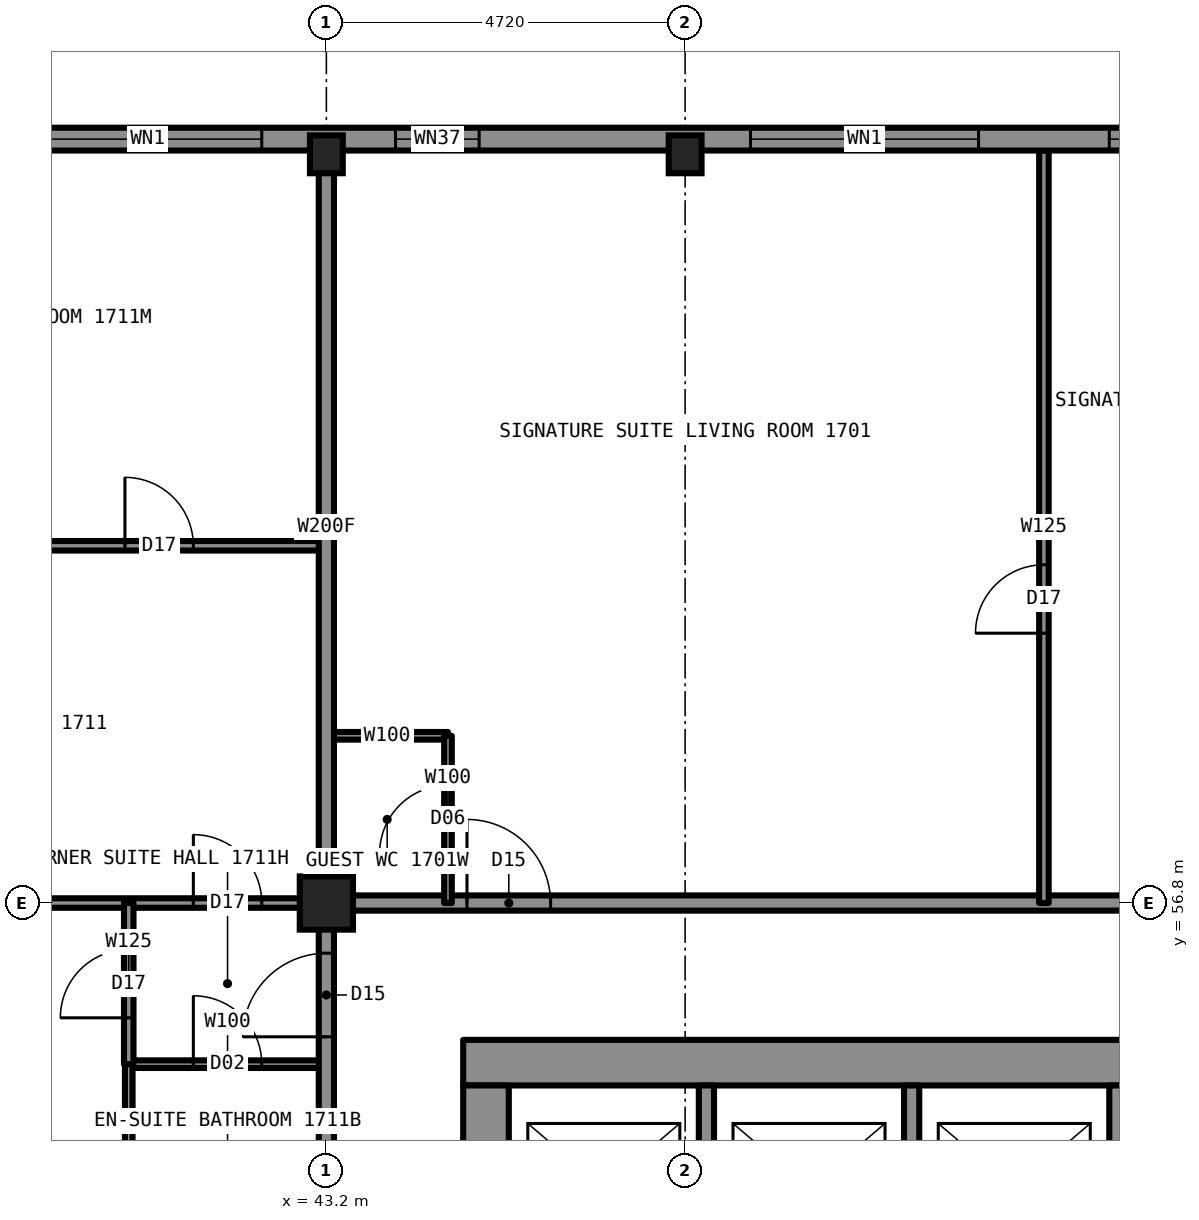
"""IFC4 building model, lengths in metres.
Left out: names, types, materials, properties, quantities, classifications, styles, units other than length and angle.
Written with IfcOpenShell. Run it as: python <this file> out.ifc"""

import sys

from ifc_helpers import new_model, si_unit, direction, frame, frame_2d, origin, origin_2d, place, context, subcontext, project, spatial, rectangle, hollow_rectangle, i_section, extrude, element, fill, save


model = new_model("IFC4")
c1 = context("Model", 3, precision=1e-05, world=origin(), true_north=direction((0.0, 1.0)))
c2 = subcontext(c1, "Body", "Model", "MODEL_VIEW")
j1 = project(units=[si_unit("LENGTHUNIT", "METRE"), si_unit("PLANEANGLEUNIT", "RADIAN")], contexts=[c1])
p1 = place(None, origin())
s1 = spatial("IfcSite", under=j1, at=p1, CompositionType="ELEMENT")
p2 = place(p1, origin())
s2 = spatial("IfcBuilding", under=s1, at=p2, CompositionType="ELEMENT")
p3 = place(p2, frame((0.0, 0.0, 60.0)))
s3 = spatial("IfcBuildingStorey", under=s2, at=p3, CompositionType="ELEMENT", Elevation=60.0)
for number, where, z_axis, x_axis in (
    (1, (43.2, 66.65, 0.0), (0.0, 0.0, 1.0), (1.0, 0.0, 0.0)),
    (2, (47.92, 66.65, 0.0), (0.0, 0.0, 1.0), (1.0, 0.0, 0.0)),
):
    element("IfcColumn", number, at=place(p3, frame(where, z_axis=z_axis, x_axis=x_axis)), inside=s3, PredefinedType="COLUMN", context=c2, shape_type="SweptSolid", body=[
        extrude(i_section(OverallWidth=0.432, OverallDepth=0.498, WebThickness=0.056, FlangeThickness=0.089, at=origin_2d()), origin(), (0.0, 0.0, 1.0), 3.5),
    ])
p4 = place(p3, frame((43.2, 56.8, 0.0), z_axis=(0.0, 0.0, 1.0), x_axis=(1.0, 0.0, 0.0)))
e3 = element("IfcColumn", 3, at=p4, inside=s3, PredefinedType="COLUMN", context=c2, shape_type="SweptSolid", body=[
    extrude(hollow_rectangle(XDim=0.7, YDim=0.7, WallThickness=0.06, at=origin_2d()), origin(), (0.0, 0.0, 1.0), 3.5),
])
p5 = place(p3, frame((45.0, 54.7, 0.0), z_axis=(0.0, 0.0, 1.0), x_axis=(1.0, 0.0, 0.0)))
e4 = element("IfcWall", 4, at=p5, inside=s3, PredefinedType="SHEAR", context=c2, shape_type="SweptSolid", body=[
    extrude(rectangle(XDim=20.0, YDim=0.6, at=frame_2d((10.0, 0.0))), origin(), (0.0, 0.0, 1.0), 3.5),
])
p6 = place(p3, frame((45.3, 35.6, 0.0), z_axis=(0.0, 0.0, 1.0), x_axis=(0.0, 1.0, 0.0)))
e5 = element("IfcWall", 5, at=p6, inside=s3, PredefinedType="SHEAR", context=c2, shape_type="SweptSolid", body=[
    extrude(rectangle(XDim=18.8, YDim=0.6, at=frame_2d((9.4, 0.0))), origin(), (0.0, 0.0, 1.0), 3.5),
])
p7 = place(p6, frame((13.4, 0.0, 0.0)))
e6 = element("IfcOpeningElement", 6, at=p7, cuts=e5, PredefinedType="OPENING", context=c2, shape_type="SweptSolid", body=[
    extrude(rectangle(XDim=1.8, YDim=2.2, at=frame_2d((0.9, 1.1))), frame((0.0, 0.31, 0.0), z_axis=(0.0, -1.0, 0.0), x_axis=(1.0, 0.0, 0.0)), (0.0, 0.0, 1.0), 0.62),
])
p8 = place(p6, frame((3.6, 0.0, 0.0)))
e7 = element("IfcOpeningElement", 7, at=p8, cuts=e5, PredefinedType="OPENING", context=c2, shape_type="SweptSolid", body=[
    extrude(rectangle(XDim=1.8, YDim=2.2, at=frame_2d((0.9, 1.1))), frame((0.0, 0.31, 0.0), z_axis=(0.0, -1.0, 0.0), x_axis=(1.0, 0.0, 0.0)), (0.0, 0.0, 1.0), 0.62),
])
p9 = place(p6, frame((6.4, 0.0, 0.0)))
e8 = element("IfcOpeningElement", 8, at=p9, cuts=e5, PredefinedType="OPENING", context=c2, shape_type="SweptSolid", body=[
    extrude(rectangle(XDim=1.2, YDim=2.2, at=frame_2d((0.6, 1.1))), frame((0.0, 0.31, 0.0), z_axis=(0.0, -1.0, 0.0), x_axis=(1.0, 0.0, 0.0)), (0.0, 0.0, 1.0), 0.62),
])
p10 = place(p3, frame((43.2, 56.8, 0.0), z_axis=(0.0, 0.0, 1.0), x_axis=(1.0, 0.0, 0.0)))
e9 = element("IfcWall", 9, at=p10, inside=s3, PredefinedType="PARTITIONING", context=c2, shape_type="SweptSolid", body=[
    extrude(rectangle(XDim=23.6, YDim=0.2, at=frame_2d((11.8, 0.0))), origin(), (0.0, 0.0, 1.0), 3.33),
])
p11 = place(p10, frame((1.85, 0.0, 0.0)))
e10 = element("IfcOpeningElement", 10, at=p11, cuts=e9, PredefinedType="OPENING", context=c2, shape_type="SweptSolid", body=[
    extrude(rectangle(XDim=1.1, YDim=2.2, at=frame_2d((0.55, 1.1))), frame((0.0, 0.11, 0.0), z_axis=(0.0, -1.0, 0.0), x_axis=(1.0, 0.0, 0.0)), (0.0, 0.0, 1.0), 0.22),
])
p12 = place(p10, frame((17.16, 0.0, 0.0)))
e11 = element("IfcOpeningElement", 11, at=p12, cuts=e9, PredefinedType="OPENING", context=c2, shape_type="SweptSolid", body=[
    extrude(rectangle(XDim=1.0, YDim=2.2, at=frame_2d((0.5, 1.1))), frame((0.0, 0.11, 0.0), z_axis=(0.0, -1.0, 0.0), x_axis=(1.0, 0.0, 0.0)), (0.0, 0.0, 1.0), 0.22),
])
p13 = place(p3, frame((33.3, 56.8, 0.0), z_axis=(0.0, 0.0, 1.0), x_axis=(1.0, 0.0, 0.0)))
e12 = element("IfcWall", 12, at=p13, inside=s3, PredefinedType="PARTITIONING", context=c2, shape_type="SweptSolid", body=[
    extrude(rectangle(XDim=9.9, YDim=0.125, at=frame_2d((4.95, 0.0))), origin(), (0.0, 0.0, 1.0), 2.573),
])
p14 = place(p13, frame((8.15, 0.0, 0.0)))
e13 = element("IfcOpeningElement", 13, at=p14, cuts=e12, PredefinedType="OPENING", context=c2, shape_type="SweptSolid", body=[
    extrude(rectangle(XDim=0.9, YDim=2.2, at=frame_2d((0.45, 1.1))), frame((0.0, 0.073, 0.0), z_axis=(0.0, -1.0, 0.0), x_axis=(1.0, 0.0, 0.0)), (0.0, 0.0, 1.0), 0.145),
])
p15 = place(p3, frame((43.2, 59.0, 0.0), z_axis=(0.0, 0.0, 1.0), x_axis=(1.0, 0.0, 0.0)))
e14 = element("IfcWall", 14, at=p15, inside=s3, PredefinedType="PARTITIONING", context=c2, shape_type="SweptSolid", body=[
    extrude(rectangle(XDim=1.6, YDim=0.1, at=frame_2d((0.8, 0.0))), origin(), (0.0, 0.0, 1.0), 3.33),
])
p16 = place(p3, frame((33.306, 61.5, 0.0), z_axis=(0.0, 0.0, 1.0), x_axis=(1.0, 0.0, 0.0)))
e15 = element("IfcWall", 15, at=p16, inside=s3, PredefinedType="PARTITIONING", context=c2, shape_type="SweptSolid", body=[
    extrude(rectangle(XDim=9.894, YDim=0.125, at=frame_2d((4.947, 0.0))), origin(), (0.0, 0.0, 1.0), 3.33),
])
p17 = place(p16, frame((7.244, 0.0, 0.0)))
e16 = element("IfcOpeningElement", 16, at=p17, cuts=e15, PredefinedType="OPENING", context=c2, shape_type="SweptSolid", body=[
    extrude(rectangle(XDim=0.9, YDim=2.2, at=frame_2d((0.45, 1.1))), frame((0.0, 0.073, 0.0), z_axis=(0.0, -1.0, 0.0), x_axis=(1.0, 0.0, 0.0)), (0.0, 0.0, 1.0), 0.145),
])
p18 = place(p3, frame((40.6, 54.68, 0.0), z_axis=(0.0, 0.0, 1.0), x_axis=(1.0, 0.0, 0.0)))
e17 = element("IfcWall", 17, at=p18, inside=s3, PredefinedType="PARTITIONING", context=c2, shape_type="SweptSolid", body=[
    extrude(rectangle(XDim=2.6, YDim=0.1, at=frame_2d((1.3, 0.0))), origin(), (0.0, 0.0, 1.0), 3.33),
])
p19 = place(p18, frame((0.85, 0.0, 0.0)))
e18 = element("IfcOpeningElement", 18, at=p19, cuts=e17, PredefinedType="OPENING", context=c2, shape_type="SweptSolid", body=[
    extrude(rectangle(XDim=0.9, YDim=2.1, at=frame_2d((0.45, 1.05))), frame((0.0, 0.06, 0.0), z_axis=(0.0, -1.0, 0.0), x_axis=(1.0, 0.0, 0.0)), (0.0, 0.0, 1.0), 0.12),
])
p20 = place(p3, frame((44.8, 56.8, 0.0), z_axis=(0.0, 0.0, 1.0), x_axis=(0.0, 1.0, 0.0)))
e19 = element("IfcWall", 19, at=p20, inside=s3, PredefinedType="PARTITIONING", context=c2, shape_type="SweptSolid", body=[
    extrude(rectangle(XDim=2.2, YDim=0.1, at=frame_2d((1.1, 0.0))), origin(), (0.0, 0.0, 1.0), 3.33),
])
p21 = place(p20, frame((0.65, 0.0, 0.0)))
e20 = element("IfcOpeningElement", 20, at=p21, cuts=e19, PredefinedType="OPENING", context=c2, shape_type="SweptSolid", body=[
    extrude(rectangle(XDim=0.9, YDim=2.1, at=frame_2d((0.45, 1.05))), frame((0.0, 0.06, 0.0), z_axis=(0.0, -1.0, 0.0), x_axis=(1.0, 0.0, 0.0)), (0.0, 0.0, 1.0), 0.12),
])
p22 = place(p3, frame((43.2, 33.22, 0.0), z_axis=(0.0, 0.0, 1.0), x_axis=(0.0, 1.0, 0.0)))
e21 = element("IfcWall", 21, at=p22, inside=s3, PredefinedType="PARTITIONING", context=c2, shape_type="SweptSolid", body=[
    extrude(rectangle(XDim=23.58, YDim=0.2, at=frame_2d((11.79, 0.0))), origin(), (0.0, 0.0, 1.0), 3.33),
])
p23 = place(p22, frame((7.7, 0.0, 0.0)))
e22 = element("IfcOpeningElement", 22, at=p23, cuts=e21, PredefinedType="OPENING", context=c2, shape_type="SweptSolid", body=[
    extrude(rectangle(XDim=1.0, YDim=2.2, at=frame_2d((0.5, 1.1))), frame((0.0, 0.11, 0.0), z_axis=(0.0, -1.0, 0.0), x_axis=(1.0, 0.0, 0.0)), (0.0, 0.0, 1.0), 0.22),
])
p24 = place(p22, frame((16.4, 0.0, 0.0)))
e23 = element("IfcOpeningElement", 23, at=p24, cuts=e21, PredefinedType="OPENING", context=c2, shape_type="SweptSolid", body=[
    extrude(rectangle(XDim=1.0, YDim=2.2, at=frame_2d((0.5, 1.1))), frame((0.0, 0.11, 0.0), z_axis=(0.0, -1.0, 0.0), x_axis=(1.0, 0.0, 0.0)), (0.0, 0.0, 1.0), 0.22),
])
p25 = place(p22, frame((21.82, 0.0, 0.0)))
e24 = element("IfcOpeningElement", 24, at=p25, cuts=e21, PredefinedType="OPENING", context=c2, shape_type="SweptSolid", body=[
    extrude(rectangle(XDim=1.1, YDim=2.2, at=frame_2d((0.55, 1.1))), frame((0.0, 0.11, 0.0), z_axis=(0.0, -1.0, 0.0), x_axis=(1.0, 0.0, 0.0)), (0.0, 0.0, 1.0), 0.22),
])
p26 = place(p22, frame((0.64, 0.0, 0.0)))
e25 = element("IfcOpeningElement", 25, at=p26, cuts=e21, PredefinedType="OPENING", context=c2, shape_type="SweptSolid", body=[
    extrude(rectangle(XDim=1.1, YDim=2.2, at=frame_2d((0.55, 1.1))), frame((0.0, 0.11, 0.0), z_axis=(0.0, -1.0, 0.0), x_axis=(1.0, 0.0, 0.0)), (0.0, 0.0, 1.0), 0.22),
])
p27 = place(p3, frame((43.2, 56.8, 0.0), z_axis=(0.0, 0.0, 1.0), x_axis=(0.0, 1.0, 0.0)))
e26 = element("IfcWall", 26, at=p27, inside=s3, PredefinedType="PARTITIONING", context=c2, shape_type="SweptSolid", body=[
    extrude(rectangle(XDim=9.9, YDim=0.2, at=frame_2d((4.95, 0.0))), origin(), (0.0, 0.0, 1.0), 2.573),
])
p28 = place(p3, frame((40.6, 52.08, 0.0), z_axis=(0.0, 0.0, 1.0), x_axis=(0.0, 1.0, 0.0)))
e27 = element("IfcWall", 27, at=p28, inside=s3, PredefinedType="PARTITIONING", context=c2, shape_type="SweptSolid", body=[
    extrude(rectangle(XDim=2.6, YDim=0.1, at=frame_2d((1.3, 0.0))), origin(), (0.0, 0.0, 1.0), 3.33),
])
p29 = place(p3, frame((40.6, 54.68, 0.0), z_axis=(0.0, 0.0, 1.0), x_axis=(0.0, 1.0, 0.0)))
e28 = element("IfcWall", 28, at=p29, inside=s3, PredefinedType="PARTITIONING", context=c2, shape_type="SweptSolid", body=[
    extrude(rectangle(XDim=2.12, YDim=0.125, at=frame_2d((1.06, 0.0))), origin(), (0.0, 0.0, 1.0), 3.33),
])
p30 = place(p29, frame((0.61, 0.0, 0.0)))
e29 = element("IfcOpeningElement", 29, at=p30, cuts=e28, PredefinedType="OPENING", context=c2, shape_type="SweptSolid", body=[
    extrude(rectangle(XDim=0.9, YDim=2.2, at=frame_2d((0.45, 1.1))), frame((0.0, 0.073, 0.0), z_axis=(0.0, -1.0, 0.0), x_axis=(1.0, 0.0, 0.0)), (0.0, 0.0, 1.0), 0.145),
])
p31 = place(p3, frame((52.64, 56.8, 0.0), z_axis=(0.0, 0.0, 1.0), x_axis=(0.0, 1.0, 0.0)))
e30 = element("IfcWall", 30, at=p31, inside=s3, PredefinedType="PARTITIONING", context=c2, shape_type="SweptSolid", body=[
    extrude(rectangle(XDim=9.9, YDim=0.125, at=frame_2d((4.95, 0.0))), origin(), (0.0, 0.0, 1.0), 3.33),
])
p32 = place(p31, frame((3.55, 0.0, 0.0)))
e31 = element("IfcOpeningElement", 31, at=p32, cuts=e30, PredefinedType="OPENING", context=c2, shape_type="SweptSolid", body=[
    extrude(rectangle(XDim=0.9, YDim=2.2, at=frame_2d((0.45, 1.1))), frame((0.0, 0.073, 0.0), z_axis=(0.0, -1.0, 0.0), x_axis=(1.0, 0.0, 0.0)), (0.0, 0.0, 1.0), 0.145),
])
p33 = place(p3, frame((71.5, 66.85, 0.0), z_axis=(0.0, 0.0, 1.0), x_axis=(-1.0, 0.0, 0.0)))
e32 = element("IfcWall", 32, at=p33, inside=s3, PredefinedType="SOLIDWALL", context=c2, shape_type="SweptSolid", body=[
    extrude(rectangle(XDim=33.0, YDim=0.3, at=frame_2d((16.5, 0.0))), origin(), (0.0, 0.0, 1.0), 2.83),
])
p34 = place(p33, frame((0.85, 0.0, 0.5)))
e33 = element("IfcOpeningElement", 33, at=p34, cuts=e32, PredefinedType="OPENING", context=c2, shape_type="SweptSolid", body=[
    extrude(rectangle(XDim=3.0, YDim=2.0, at=frame_2d((1.5, 1.0))), frame((0.0, 0.16, 0.0), z_axis=(0.0, -1.0, 0.0), x_axis=(1.0, 0.0, 0.0)), (0.0, 0.0, 1.0), 0.32),
])
p35 = place(p33, frame((5.56, 0.0, 0.5)))
e34 = element("IfcOpeningElement", 34, at=p35, cuts=e32, PredefinedType="OPENING", context=c2, shape_type="SweptSolid", body=[
    extrude(rectangle(XDim=3.0, YDim=2.0, at=frame_2d((1.5, 1.0))), frame((0.0, 0.16, 0.0), z_axis=(0.0, -1.0, 0.0), x_axis=(1.0, 0.0, 0.0)), (0.0, 0.0, 1.0), 0.32),
])
p36 = place(p33, frame((10.28, 0.0, 0.5)))
e35 = element("IfcOpeningElement", 35, at=p36, cuts=e32, PredefinedType="OPENING", context=c2, shape_type="SweptSolid", body=[
    extrude(rectangle(XDim=1.2, YDim=1.7, at=frame_2d((0.6, 0.85))), frame((0.0, 0.16, 0.0), z_axis=(0.0, -1.0, 0.0), x_axis=(1.0, 0.0, 0.0)), (0.0, 0.0, 1.0), 0.32),
])
p37 = place(p33, frame((15.0, 0.0, 0.5)))
e36 = element("IfcOpeningElement", 36, at=p37, cuts=e32, PredefinedType="OPENING", context=c2, shape_type="SweptSolid", body=[
    extrude(rectangle(XDim=3.0, YDim=2.0, at=frame_2d((1.5, 1.0))), frame((0.0, 0.16, 0.0), z_axis=(0.0, -1.0, 0.0), x_axis=(1.0, 0.0, 0.0)), (0.0, 0.0, 1.0), 0.32),
])
p38 = place(p33, frame((21.52, 0.0, 0.5)))
e37 = element("IfcOpeningElement", 37, at=p38, cuts=e32, PredefinedType="OPENING", context=c2, shape_type="SweptSolid", body=[
    extrude(rectangle(XDim=1.2, YDim=1.7, at=frame_2d((0.6, 0.85))), frame((0.0, 0.16, 0.0), z_axis=(0.0, -1.0, 0.0), x_axis=(1.0, 0.0, 0.0)), (0.0, 0.0, 1.0), 0.32),
])
p39 = place(p33, frame((24.44, 0.0, 0.5)))
e38 = element("IfcOpeningElement", 38, at=p39, cuts=e32, PredefinedType="OPENING", context=c2, shape_type="SweptSolid", body=[
    extrude(rectangle(XDim=3.0, YDim=2.0, at=frame_2d((1.5, 1.0))), frame((0.0, 0.16, 0.0), z_axis=(0.0, -1.0, 0.0), x_axis=(1.0, 0.0, 0.0)), (0.0, 0.0, 1.0), 0.32),
])
p40 = place(p33, frame((29.15, 0.0, 0.5)))
e39 = element("IfcOpeningElement", 39, at=p40, cuts=e32, PredefinedType="OPENING", context=c2, shape_type="SweptSolid", body=[
    extrude(rectangle(XDim=3.0, YDim=2.0, at=frame_2d((1.5, 1.0))), frame((0.0, 0.16, 0.0), z_axis=(0.0, -1.0, 0.0), x_axis=(1.0, 0.0, 0.0)), (0.0, 0.0, 1.0), 0.32),
])
p41 = place(p33, frame((11.48, 0.0, 0.5)))
e40 = element("IfcOpeningElement", 40, at=p41, cuts=e32, PredefinedType="OPENING", context=c2, shape_type="SweptSolid", body=[
    extrude(rectangle(XDim=0.6, YDim=0.8, at=frame_2d((0.3, 0.4))), frame((0.0, 0.16, 0.0), z_axis=(0.0, -1.0, 0.0), x_axis=(1.0, 0.0, 0.0)), (0.0, 0.0, 1.0), 0.32),
])
p42 = place(p33, frame((20.87, 0.0, 0.5)))
e41 = element("IfcOpeningElement", 41, at=p42, cuts=e32, PredefinedType="OPENING", context=c2, shape_type="SweptSolid", body=[
    extrude(rectangle(XDim=0.6, YDim=0.8, at=frame_2d((0.3, 0.4))), frame((0.0, 0.16, 0.0), z_axis=(0.0, -1.0, 0.0), x_axis=(1.0, 0.0, 0.0)), (0.0, 0.0, 1.0), 0.32),
])
for number, where, z_axis, x_axis in (
    (42, (48.2, 51.7, 0.0), (0.0, 0.0, 1.0), (0.0, 1.0, 0.0)),
    (43, (50.9, 51.7, 0.0), (0.0, 0.0, 1.0), (0.0, 1.0, 0.0)),
    (44, (53.6, 51.7, 0.0), (0.0, 0.0, 1.0), (0.0, 1.0, 0.0)),
):
    element("IfcWall", number, at=place(p3, frame(where, z_axis=z_axis, x_axis=x_axis)), inside=s3, PredefinedType="PARTITIONING", context=c2, shape_type="SweptSolid", body=[
        extrude(rectangle(XDim=2.7, YDim=0.2, at=frame_2d((1.35, 0.0))), origin(), (0.0, 0.0, 1.0), 3.33),
    ])
p43 = place(p11, origin())
e45 = element("IfcDoor", 45, at=p43, inside=s3, OperationType="SINGLE_SWING_LEFT", PredefinedType="DOOR", context=c2, shape_type="SweptSolid", body=[
    extrude(rectangle(XDim=1.1, YDim=2.2, at=frame_2d((0.55, 1.1))), frame((0.0, 0.025, 0.0), z_axis=(0.0, -1.0, 0.0), x_axis=(1.0, 0.0, 0.0)), (0.0, 0.0, 1.0), 0.05),
])
fill(e10, e45)
p44 = place(p32, origin())
e46 = element("IfcDoor", 46, at=p44, inside=s3, OperationType="SINGLE_SWING_LEFT", PredefinedType="DOOR", context=c2, shape_type="SweptSolid", body=[
    extrude(rectangle(XDim=0.9, YDim=2.2, at=frame_2d((0.45, 1.1))), frame((0.0, 0.025, 0.0), z_axis=(0.0, -1.0, 0.0), x_axis=(1.0, 0.0, 0.0)), (0.0, 0.0, 1.0), 0.05),
])
fill(e31, e46)
p45 = place(p21, origin())
e47 = element("IfcDoor", 47, at=p45, inside=s3, OperationType="SINGLE_SWING_LEFT", PredefinedType="DOOR", context=c2, shape_type="SweptSolid", body=[
    extrude(rectangle(XDim=0.9, YDim=2.1, at=frame_2d((0.45, 1.05))), frame((0.0, 0.025, 0.0), z_axis=(0.0, -1.0, 0.0), x_axis=(1.0, 0.0, 0.0)), (0.0, 0.0, 1.0), 0.05),
])
fill(e20, e47)
p46 = place(p14, origin())
e48 = element("IfcDoor", 48, at=p46, inside=s3, OperationType="SINGLE_SWING_LEFT", PredefinedType="DOOR", context=c2, shape_type="SweptSolid", body=[
    extrude(rectangle(XDim=0.9, YDim=2.2, at=frame_2d((0.45, 1.1))), frame((0.0, 0.025, 0.0), z_axis=(0.0, -1.0, 0.0), x_axis=(1.0, 0.0, 0.0)), (0.0, 0.0, 1.0), 0.05),
])
fill(e13, e48)
p47 = place(p19, origin())
e49 = element("IfcDoor", 49, at=p47, inside=s3, OperationType="SINGLE_SWING_RIGHT", PredefinedType="DOOR", context=c2, shape_type="SweptSolid", body=[
    extrude(rectangle(XDim=0.9, YDim=2.1, at=frame_2d((0.45, 1.05))), frame((0.0, 0.025, 0.0), z_axis=(0.0, -1.0, 0.0), x_axis=(1.0, 0.0, 0.0)), (0.0, 0.0, 1.0), 0.05),
])
fill(e18, e49)
p48 = place(p25, origin())
e50 = element("IfcDoor", 50, at=p48, inside=s3, OperationType="SINGLE_SWING_LEFT", PredefinedType="DOOR", context=c2, shape_type="SweptSolid", body=[
    extrude(rectangle(XDim=1.1, YDim=2.2, at=frame_2d((0.55, 1.1))), frame((0.0, 0.025, 0.0), z_axis=(0.0, -1.0, 0.0), x_axis=(1.0, 0.0, 0.0)), (0.0, 0.0, 1.0), 0.05),
])
fill(e24, e50)
p49 = place(p17, origin())
e51 = element("IfcDoor", 51, at=p49, inside=s3, OperationType="SINGLE_SWING_LEFT", PredefinedType="DOOR", context=c2, shape_type="SweptSolid", body=[
    extrude(rectangle(XDim=0.9, YDim=2.2, at=frame_2d((0.45, 1.1))), frame((0.0, 0.025, 0.0), z_axis=(0.0, -1.0, 0.0), x_axis=(1.0, 0.0, 0.0)), (0.0, 0.0, 1.0), 0.05),
])
fill(e16, e51)
p50 = place(p30, origin())
e52 = element("IfcDoor", 52, at=p50, inside=s3, OperationType="SINGLE_SWING_LEFT", PredefinedType="DOOR", context=c2, shape_type="SweptSolid", body=[
    extrude(rectangle(XDim=0.9, YDim=2.2, at=frame_2d((0.45, 1.1))), frame((0.0, 0.025, 0.0), z_axis=(0.0, -1.0, 0.0), x_axis=(1.0, 0.0, 0.0)), (0.0, 0.0, 1.0), 0.05),
])
fill(e29, e52)
p51 = place(p37, origin())
e53 = element("IfcWindow", 53, at=p51, inside=s3, PartitioningType="SINGLE_PANEL", PredefinedType="WINDOW", context=c2, shape_type="SweptSolid", body=[
    extrude(rectangle(XDim=3.0, YDim=2.0, at=frame_2d((1.5, 1.0))), frame((0.0, 0.03, 0.0), z_axis=(0.0, -1.0, 0.0), x_axis=(1.0, 0.0, 0.0)), (0.0, 0.0, 1.0), 0.06),
])
fill(e36, e53)
p52 = place(p38, origin())
e54 = element("IfcWindow", 54, at=p52, inside=s3, PartitioningType="SINGLE_PANEL", PredefinedType="WINDOW", context=c2, shape_type="SweptSolid", body=[
    extrude(rectangle(XDim=1.2, YDim=1.7, at=frame_2d((0.6, 0.85))), frame((0.0, 0.03, 0.0), z_axis=(0.0, -1.0, 0.0), x_axis=(1.0, 0.0, 0.0)), (0.0, 0.0, 1.0), 0.06),
])
fill(e37, e54)
p53 = place(p39, origin())
e55 = element("IfcWindow", 55, at=p53, inside=s3, PartitioningType="SINGLE_PANEL", PredefinedType="WINDOW", context=c2, shape_type="SweptSolid", body=[
    extrude(rectangle(XDim=3.0, YDim=2.0, at=frame_2d((1.5, 1.0))), frame((0.0, 0.03, 0.0), z_axis=(0.0, -1.0, 0.0), x_axis=(1.0, 0.0, 0.0)), (0.0, 0.0, 1.0), 0.06),
])
fill(e38, e55)
p54 = place(p40, origin())
e56 = element("IfcWindow", 56, at=p54, inside=s3, PartitioningType="SINGLE_PANEL", PredefinedType="WINDOW", context=c2, shape_type="SweptSolid", body=[
    extrude(rectangle(XDim=3.0, YDim=2.0, at=frame_2d((1.5, 1.0))), frame((0.0, 0.03, 0.0), z_axis=(0.0, -1.0, 0.0), x_axis=(1.0, 0.0, 0.0)), (0.0, 0.0, 1.0), 0.06),
])
fill(e39, e56)
p55 = place(p42, origin())
e57 = element("IfcWindow", 57, at=p55, inside=s3, PartitioningType="SINGLE_PANEL", PredefinedType="WINDOW", context=c2, shape_type="SweptSolid", body=[
    extrude(rectangle(XDim=0.6, YDim=0.8, at=frame_2d((0.3, 0.4))), frame((0.0, 0.03, 0.0), z_axis=(0.0, -1.0, 0.0), x_axis=(1.0, 0.0, 0.0)), (0.0, 0.0, 1.0), 0.06),
])
fill(e41, e57)
save(model, sys.argv[1])
